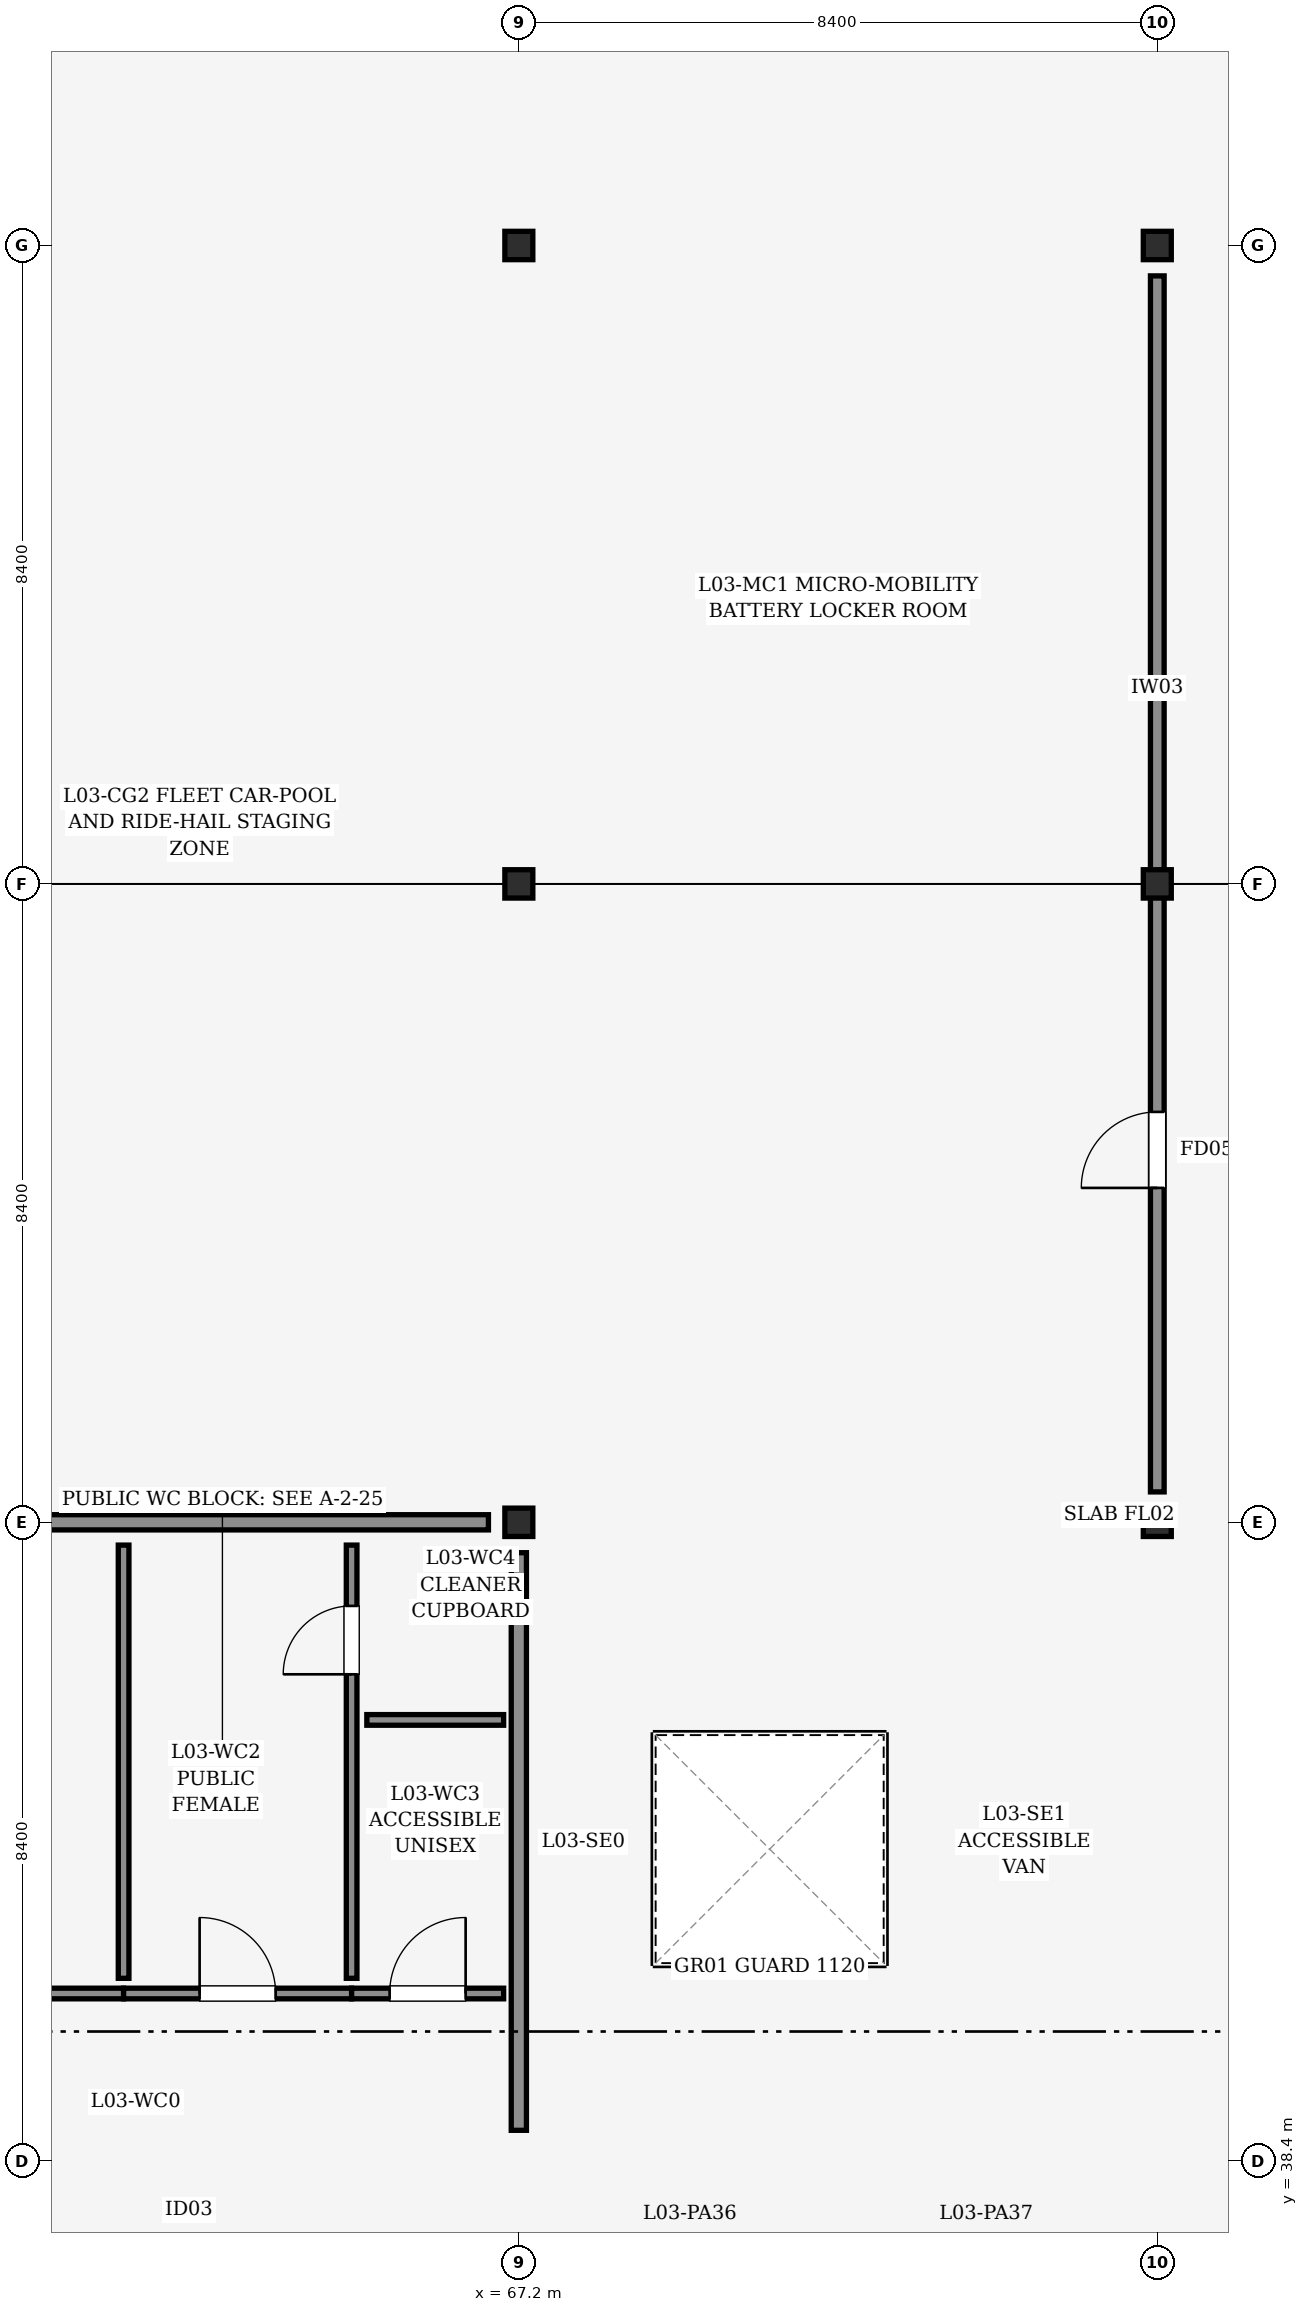
"""IFC4 building model, lengths in metres.
Left out: names, types, materials, properties, quantities, classifications, styles, units other than length and angle.
Written with IfcOpenShell. Run it as: python <this file> out.ifc"""

import sys

from ifc_helpers import new_model, si_unit, direction, frame, frame_2d, origin, origin_2d, place, context, subcontext, project, spatial, rectangle, i_section, extrude, element, fill, save


model = new_model("IFC4")
c1 = context("Model", 3, precision=1e-05, world=origin(), true_north=direction((0.0, 1.0)))
c2 = subcontext(c1, "Body", "Model", "MODEL_VIEW")
j1 = project(units=[si_unit("LENGTHUNIT", "METRE"), si_unit("PLANEANGLEUNIT", "RADIAN")], contexts=[c1])
p1 = place(None, origin())
s1 = spatial("IfcSite", under=j1, at=p1, CompositionType="ELEMENT")
p2 = place(p1, origin())
s2 = spatial("IfcBuilding", under=s1, at=p2, CompositionType="ELEMENT")
p3 = place(p2, frame((0.0, 0.0, 12.6)))
s3 = spatial("IfcBuildingStorey", under=s2, at=p3, CompositionType="ELEMENT", Elevation=12.6)
for number, where, z_axis, x_axis in (
    (1, (67.2, 38.4, 0.0), (0.0, 0.0, 1.0), (1.0, 0.0, 0.0)),
    (2, (67.2, 46.8, 0.0), (0.0, 0.0, 1.0), (1.0, 0.0, 0.0)),
    (3, (67.2, 55.2, 0.0), (0.0, 0.0, 1.0), (1.0, 0.0, 0.0)),
    (4, (67.2, 63.6, 0.0), (0.0, 0.0, 1.0), (1.0, 0.0, 0.0)),
    (5, (75.6, 38.4, 0.0), (0.0, 0.0, 1.0), (1.0, 0.0, 0.0)),
    (6, (75.6, 46.8, 0.0), (0.0, 0.0, 1.0), (1.0, 0.0, 0.0)),
    (7, (75.6, 55.2, 0.0), (0.0, 0.0, 1.0), (1.0, 0.0, 0.0)),
    (8, (75.6, 63.6, 0.0), (0.0, 0.0, 1.0), (1.0, 0.0, 0.0)),
):
    element("IfcColumn", number, at=place(p3, frame(where, z_axis=z_axis, x_axis=x_axis)), inside=s3, PredefinedType="COLUMN", context=c2, shape_type="SweptSolid", body=[
        extrude(i_section(OverallWidth=0.373, OverallDepth=0.368, WebThickness=0.014, FlangeThickness=0.024, FilletRadius=0.015, at=origin_2d()), origin(), (0.0, 0.0, 1.0), 3.6),
    ])
p4 = place(p3, frame((59.2, 38.4, 0.0), z_axis=(0.0, 0.0, 1.0), x_axis=(1.0, 0.0, 0.0)))
e9 = element("IfcWall", 9, at=p4, inside=s3, PredefinedType="PARTITIONING", context=c2, shape_type="SweptSolid", body=[
    extrude(rectangle(XDim=7.6, YDim=0.2, at=frame_2d((3.8, 0.0))), origin(), (0.0, 0.0, 1.0), 2.525),
])
p5 = place(p4, frame((3.2, 0.0, 0.0)))
e10 = element("IfcOpeningElement", 10, at=p5, cuts=e9, PredefinedType="OPENING", context=c2, shape_type="SweptSolid", body=[
    extrude(rectangle(XDim=0.92, YDim=2.1, at=frame_2d((0.46, 1.05))), frame((0.0, 0.11, 0.0), z_axis=(0.0, -1.0, 0.0), x_axis=(1.0, 0.0, 0.0)), (0.0, 0.0, 1.0), 0.22),
])
p6 = place(p3, frame((59.2, 46.8, 0.0), z_axis=(0.0, 0.0, 1.0), x_axis=(1.0, 0.0, 0.0)))
e11 = element("IfcWall", 11, at=p6, inside=s3, PredefinedType="PARTITIONING", context=c2, shape_type="SweptSolid", body=[
    extrude(rectangle(XDim=7.6, YDim=0.2, at=frame_2d((3.8, 0.0))), origin(), (0.0, 0.0, 1.0), 2.525),
])
p7 = place(p3, frame((67.2, 38.8, 0.0), z_axis=(0.0, 0.0, 1.0), x_axis=(0.0, 1.0, 0.0)))
e12 = element("IfcWall", 12, at=p7, inside=s3, PredefinedType="PARTITIONING", context=c2, shape_type="SweptSolid", body=[
    extrude(rectangle(XDim=7.6, YDim=0.2, at=frame_2d((3.8, 0.0))), origin(), (0.0, 0.0, 1.0), 2.525),
])
p8 = place(p3, frame((59.0, 40.6, 0.0), z_axis=(0.0, 0.0, 1.0), x_axis=(1.0, 0.0, 0.0)))
e13 = element("IfcWall", 13, at=p8, inside=s3, PredefinedType="PARTITIONING", context=c2, shape_type="SweptSolid", body=[
    extrude(rectangle(XDim=3.0, YDim=0.14, at=frame_2d((1.5, 0.0))), origin(), (0.0, 0.0, 1.0), 2.525),
])
p9 = place(p8, frame((1.0, 0.0, 0.0)))
e14 = element("IfcOpeningElement", 14, at=p9, cuts=e13, PredefinedType="OPENING", context=c2, shape_type="SweptSolid", body=[
    extrude(rectangle(XDim=1.0, YDim=2.1, at=frame_2d((0.5, 1.05))), frame((0.0, 0.08, 0.0), z_axis=(0.0, -1.0, 0.0), x_axis=(1.0, 0.0, 0.0)), (0.0, 0.0, 1.0), 0.16),
])
p10 = place(p3, frame((62.0, 40.6, 0.0), z_axis=(0.0, 0.0, 1.0), x_axis=(1.0, 0.0, 0.0)))
e15 = element("IfcWall", 15, at=p10, inside=s3, PredefinedType="PARTITIONING", context=c2, shape_type="SweptSolid", body=[
    extrude(rectangle(XDim=3.0, YDim=0.14, at=frame_2d((1.5, 0.0))), origin(), (0.0, 0.0, 1.0), 2.525),
])
p11 = place(p10, frame((1.0, 0.0, 0.0)))
e16 = element("IfcOpeningElement", 16, at=p11, cuts=e15, PredefinedType="OPENING", context=c2, shape_type="SweptSolid", body=[
    extrude(rectangle(XDim=1.0, YDim=2.1, at=frame_2d((0.5, 1.05))), frame((0.0, 0.08, 0.0), z_axis=(0.0, -1.0, 0.0), x_axis=(1.0, 0.0, 0.0)), (0.0, 0.0, 1.0), 0.16),
])
p12 = place(p3, frame((65.0, 40.6, 0.0), z_axis=(0.0, 0.0, 1.0), x_axis=(1.0, 0.0, 0.0)))
e17 = element("IfcWall", 17, at=p12, inside=s3, PredefinedType="PARTITIONING", context=c2, shape_type="SweptSolid", body=[
    extrude(rectangle(XDim=2.0, YDim=0.14, at=frame_2d((1.0, 0.0))), origin(), (0.0, 0.0, 1.0), 2.525),
])
p13 = place(p12, frame((0.5, 0.0, 0.0)))
e18 = element("IfcOpeningElement", 18, at=p13, cuts=e17, PredefinedType="OPENING", context=c2, shape_type="SweptSolid", body=[
    extrude(rectangle(XDim=1.0, YDim=2.1, at=frame_2d((0.5, 1.05))), frame((0.0, 0.08, 0.0), z_axis=(0.0, -1.0, 0.0), x_axis=(1.0, 0.0, 0.0)), (0.0, 0.0, 1.0), 0.16),
])
p14 = place(p3, frame((62.0, 40.8, 0.0), z_axis=(0.0, 0.0, 1.0), x_axis=(0.0, 1.0, 0.0)))
e19 = element("IfcWall", 19, at=p14, inside=s3, PredefinedType="PARTITIONING", context=c2, shape_type="SweptSolid", body=[
    extrude(rectangle(XDim=5.7, YDim=0.14, at=frame_2d((2.85, 0.0))), origin(), (0.0, 0.0, 1.0), 2.525),
])
p15 = place(p3, frame((65.0, 40.8, 0.0), z_axis=(0.0, 0.0, 1.0), x_axis=(0.0, 1.0, 0.0)))
e20 = element("IfcWall", 20, at=p15, inside=s3, PredefinedType="PARTITIONING", context=c2, shape_type="SweptSolid", body=[
    extrude(rectangle(XDim=5.7, YDim=0.14, at=frame_2d((2.85, 0.0))), origin(), (0.0, 0.0, 1.0), 2.525),
])
p16 = place(p15, frame((4.0, 0.0, 0.0)))
e21 = element("IfcOpeningElement", 21, at=p16, cuts=e20, PredefinedType="OPENING", context=c2, shape_type="SweptSolid", body=[
    extrude(rectangle(XDim=0.9, YDim=2.05, at=frame_2d((0.45, 1.025))), frame((0.0, 0.08, 0.0), z_axis=(0.0, -1.0, 0.0), x_axis=(1.0, 0.0, 0.0)), (0.0, 0.0, 1.0), 0.16),
])
p17 = place(p3, frame((65.2, 44.2, 0.0), z_axis=(0.0, 0.0, 1.0), x_axis=(1.0, 0.0, 0.0)))
e22 = element("IfcWall", 22, at=p17, inside=s3, PredefinedType="PARTITIONING", context=c2, shape_type="SweptSolid", body=[
    extrude(rectangle(XDim=1.8, YDim=0.14, at=frame_2d((0.9, 0.0))), origin(), (0.0, 0.0, 1.0), 2.525),
])
p18 = place(p3, frame((75.6, 47.2, 0.0), z_axis=(0.0, 0.0, 1.0), x_axis=(0.0, 1.0, 0.0)))
e23 = element("IfcWall", 23, at=p18, inside=s3, PredefinedType="PARTITIONING", context=c2, shape_type="SweptSolid", body=[
    extrude(rectangle(XDim=16.0, YDim=0.18, at=frame_2d((8.0, 0.0))), origin(), (0.0, 0.0, 1.0), 2.525),
])
p19 = place(p18, frame((4.0, 0.0, 0.0)))
e24 = element("IfcOpeningElement", 24, at=p19, cuts=e23, PredefinedType="OPENING", context=c2, shape_type="SweptSolid", body=[
    extrude(rectangle(XDim=1.0, YDim=2.15, at=frame_2d((0.5, 1.075))), frame((0.0, 0.1, 0.0), z_axis=(0.0, -1.0, 0.0), x_axis=(1.0, 0.0, 0.0)), (0.0, 0.0, 1.0), 0.2),
])
p20 = place(p5, origin())
e25 = element("IfcDoor", 25, at=p20, inside=s3, OperationType="SINGLE_SWING_LEFT", PredefinedType="DOOR", context=c2, shape_type="SweptSolid", body=[
    extrude(rectangle(XDim=0.92, YDim=2.1, at=frame_2d((0.46, 1.05))), frame((0.0, 0.025, 0.0), z_axis=(0.0, -1.0, 0.0), x_axis=(1.0, 0.0, 0.0)), (0.0, 0.0, 1.0), 0.05),
])
fill(e10, e25)
p21 = place(p11, origin())
e26 = element("IfcDoor", 26, at=p21, inside=s3, OperationType="SINGLE_SWING_LEFT", PredefinedType="DOOR", context=c2, shape_type="SweptSolid", body=[
    extrude(rectangle(XDim=1.0, YDim=2.1, at=frame_2d((0.5, 1.05))), frame((0.0, 0.025, 0.0), z_axis=(0.0, -1.0, 0.0), x_axis=(1.0, 0.0, 0.0)), (0.0, 0.0, 1.0), 0.05),
])
fill(e16, e26)
p22 = place(p13, origin())
e27 = element("IfcDoor", 27, at=p22, inside=s3, OperationType="SINGLE_SWING_RIGHT", PredefinedType="DOOR", context=c2, shape_type="SweptSolid", body=[
    extrude(rectangle(XDim=1.0, YDim=2.1, at=frame_2d((0.5, 1.05))), frame((0.0, 0.025, 0.0), z_axis=(0.0, -1.0, 0.0), x_axis=(1.0, 0.0, 0.0)), (0.0, 0.0, 1.0), 0.05),
])
fill(e18, e27)
p23 = place(p16, origin())
e28 = element("IfcDoor", 28, at=p23, inside=s3, OperationType="SINGLE_SWING_LEFT", PredefinedType="DOOR", context=c2, shape_type="SweptSolid", body=[
    extrude(rectangle(XDim=0.9, YDim=2.05, at=frame_2d((0.45, 1.025))), frame((0.0, 0.025, 0.0), z_axis=(0.0, -1.0, 0.0), x_axis=(1.0, 0.0, 0.0)), (0.0, 0.0, 1.0), 0.05),
])
fill(e21, e28)
p24 = place(p19, origin())
e29 = element("IfcDoor", 29, at=p24, inside=s3, OperationType="SINGLE_SWING_LEFT", PredefinedType="DOOR", context=c2, shape_type="SweptSolid", body=[
    extrude(rectangle(XDim=1.0, YDim=2.15, at=frame_2d((0.5, 1.075))), frame((0.0, 0.025, 0.0), z_axis=(0.0, -1.0, 0.0), x_axis=(1.0, 0.0, 0.0)), (0.0, 0.0, 1.0), 0.05),
])
fill(e24, e29)
save(model, sys.argv[1])
